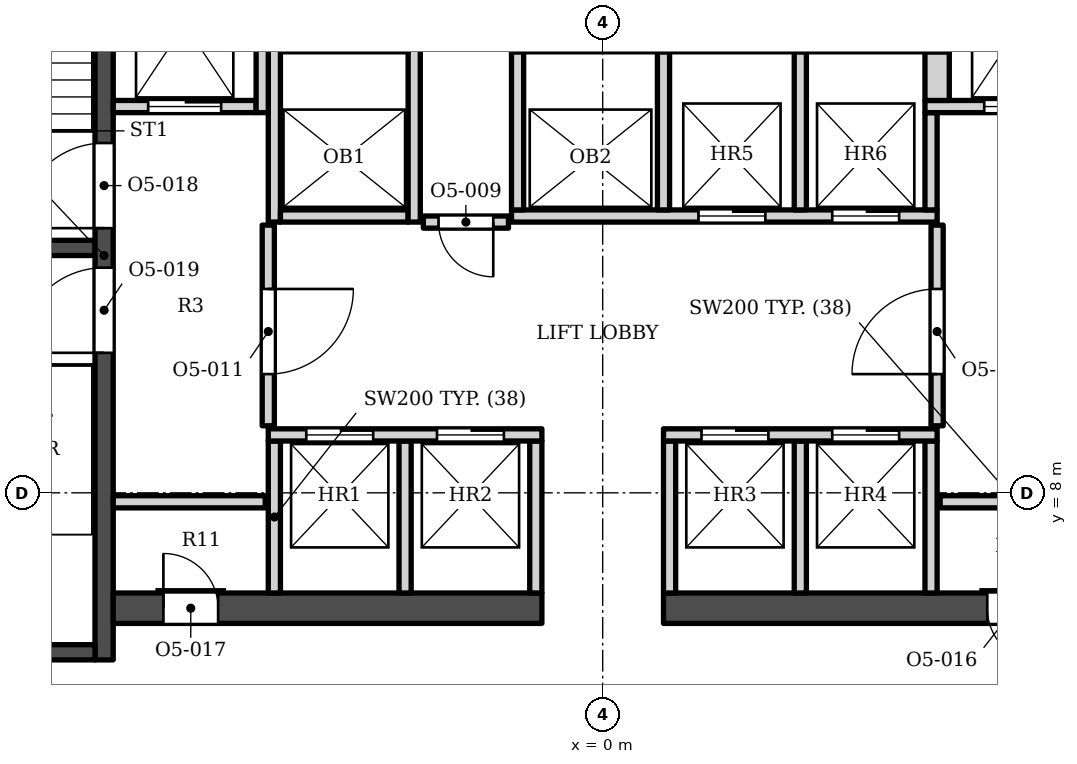
"""IFC4 building model, lengths in metres.
Left out: names, types, materials, properties, quantities, classifications, styles, units other than length and angle.
Written with IfcOpenShell. Run it as: python <this file> out.ifc"""

import sys

from ifc_helpers import new_model, si_unit, direction, frame, frame_2d, origin, place, context, subcontext, project, spatial, rectangle, extrude, element, fill, save


model = new_model("IFC4")
c1 = context("Model", 3, precision=1e-05, world=origin(), true_north=direction((0.0, 1.0)))
c2 = subcontext(c1, "Body", "Model", "MODEL_VIEW")
j1 = project(units=[si_unit("LENGTHUNIT", "METRE"), si_unit("PLANEANGLEUNIT", "RADIAN")], contexts=[c1])
p1 = place(None, origin())
s1 = spatial("IfcSite", under=j1, at=p1, CompositionType="ELEMENT")
p2 = place(p1, origin())
s2 = spatial("IfcBuilding", under=s1, at=p2, CompositionType="ELEMENT")
p3 = place(p2, frame((0.0, 0.0, 196.4)))
s3 = spatial("IfcBuildingStorey", under=s2, at=p3, CompositionType="ELEMENT", Elevation=196.4)
p4 = place(p3, frame((-8.2, 5.253, 0.0), z_axis=(0.0, 0.0, 1.0), x_axis=(0.0, 1.0, 0.0)))
e1 = element("IfcWall", 1, at=p4, inside=s3, PredefinedType="SHEAR", context=c2, shape_type="SweptSolid", body=[
    extrude(rectangle(XDim=13.3, YDim=0.3, at=frame_2d((6.65, 0.0))), origin(), (0.0, 0.0, 1.0), 3.9),
])
p5 = place(p4, frame((7.1, 0.0, 0.0)))
e2 = element("IfcOpeningElement", 2, at=p5, cuts=e1, PredefinedType="OPENING", context=c2, shape_type="SweptSolid", body=[
    extrude(rectangle(XDim=1.4, YDim=2.1, at=frame_2d((0.7, 1.05))), frame((0.0, 0.16, 0.0), z_axis=(0.0, -1.0, 0.0), x_axis=(1.0, 0.0, 0.0)), (0.0, 0.0, 1.0), 0.32),
])
p6 = place(p4, frame((5.05, 0.0, 0.0)))
e3 = element("IfcOpeningElement", 3, at=p6, cuts=e1, PredefinedType="OPENING", context=c2, shape_type="SweptSolid", body=[
    extrude(rectangle(XDim=1.4, YDim=2.1, at=frame_2d((0.7, 1.05))), frame((0.0, 0.16, 0.0), z_axis=(0.0, -1.0, 0.0), x_axis=(1.0, 0.0, 0.0)), (0.0, 0.0, 1.0), 0.32),
])
for number, where, z_axis, x_axis in (
    (4, (-12.1, 12.028, 0.0), (0.0, 0.0, 1.0), (1.0, 0.0, 0.0)),
    (5, (-12.1, 5.378, 0.0), (0.0, 0.0, 1.0), (1.0, 0.0, 0.0)),
):
    element("IfcWall", number, at=place(p3, frame(where, z_axis=z_axis, x_axis=x_axis)), inside=s3, PredefinedType="SHEAR", context=c2, shape_type="SweptSolid", body=[
        extrude(rectangle(XDim=3.75, YDim=0.25, at=frame_2d((1.875, 0.0))), origin(), (0.0, 0.0, 1.0), 3.9),
    ])
p7 = place(p3, frame((-8.05, 6.103, 0.0), z_axis=(0.0, 0.0, 1.0), x_axis=(1.0, 0.0, 0.0)))
e6 = element("IfcWall", 6, at=p7, inside=s3, PredefinedType="SHEAR", context=c2, shape_type="SweptSolid", body=[
    extrude(rectangle(XDim=7.05, YDim=0.5, at=frame_2d((3.525, 0.0))), origin(), (0.0, 0.0, 1.0), 3.9),
])
p8 = place(p7, frame((0.825, 0.0, 0.0)))
e7 = element("IfcOpeningElement", 7, at=p8, cuts=e6, PredefinedType="OPENING", context=c2, shape_type="SweptSolid", body=[
    extrude(rectangle(XDim=0.9, YDim=2.1, at=frame_2d((0.45, 1.05))), frame((0.0, 0.26, 0.0), z_axis=(0.0, -1.0, 0.0), x_axis=(1.0, 0.0, 0.0)), (0.0, 0.0, 1.0), 0.52),
])
p9 = place(p3, frame((1.0, 6.103, 0.0), z_axis=(0.0, 0.0, 1.0), x_axis=(1.0, 0.0, 0.0)))
e8 = element("IfcWall", 8, at=p9, inside=s3, PredefinedType="SHEAR", context=c2, shape_type="SweptSolid", body=[
    extrude(rectangle(XDim=7.05, YDim=0.5, at=frame_2d((3.525, 0.0))), origin(), (0.0, 0.0, 1.0), 3.9),
])
p10 = place(p9, frame((5.325, 0.0, 0.0)))
e9 = element("IfcOpeningElement", 9, at=p10, cuts=e8, PredefinedType="OPENING", context=c2, shape_type="SweptSolid", body=[
    extrude(rectangle(XDim=0.9, YDim=2.1, at=frame_2d((0.45, 1.05))), frame((0.0, 0.26, 0.0), z_axis=(0.0, -1.0, 0.0), x_axis=(1.0, 0.0, 0.0)), (0.0, 0.0, 1.0), 0.52),
])
for number, where, z_axis, x_axis in (
    (10, (-5.4, 6.353, 0.0), (0.0, 0.0, 1.0), (0.0, 1.0, 0.0)),
    (11, (-3.25, 6.353, 0.0), (0.0, 0.0, 1.0), (0.0, 1.0, 0.0)),
    (12, (-1.1, 6.353, 0.0), (0.0, 0.0, 1.0), (0.0, 1.0, 0.0)),
    (13, (1.1, 6.353, 0.0), (0.0, 0.0, 1.0), (0.0, 1.0, 0.0)),
    (14, (3.25, 6.353, 0.0), (0.0, 0.0, 1.0), (0.0, 1.0, 0.0)),
    (15, (5.4, 6.353, 0.0), (0.0, 0.0, 1.0), (0.0, 1.0, 0.0)),
    (16, (-8.05, 7.853, 0.0), (0.0, 0.0, 1.0), (1.0, 0.0, 0.0)),
    (17, (5.55, 7.853, 0.0), (0.0, 0.0, 1.0), (1.0, 0.0, 0.0)),
):
    element("IfcWall", number, at=place(p3, frame(where, z_axis=z_axis, x_axis=x_axis)), inside=s3, PredefinedType="SOLIDWALL", context=c2, shape_type="SweptSolid", body=[
        extrude(rectangle(XDim=2.5, YDim=0.2, at=frame_2d((1.25, 0.0))), origin(), (0.0, 0.0, 1.0), 3.73),
    ])
p11 = place(p3, frame((-5.5, 8.953, 0.0), z_axis=(0.0, 0.0, 1.0), x_axis=(1.0, 0.0, 0.0)))
e18 = element("IfcWall", 18, at=p11, inside=s3, PredefinedType="SOLIDWALL", context=c2, shape_type="SweptSolid", body=[
    extrude(rectangle(XDim=4.5, YDim=0.2, at=frame_2d((2.25, 0.0))), origin(), (0.0, 0.0, 1.0), 3.73),
])
p12 = place(p11, frame((0.625, 0.0, 0.0)))
e19 = element("IfcOpeningElement", 19, at=p12, cuts=e18, PredefinedType="OPENING", context=c2, shape_type="SweptSolid", body=[
    extrude(rectangle(XDim=1.1, YDim=2.1, at=frame_2d((0.55, 1.05))), frame((0.0, 0.11, 0.0), z_axis=(0.0, -1.0, 0.0), x_axis=(1.0, 0.0, 0.0)), (0.0, 0.0, 1.0), 0.22),
])
p13 = place(p11, frame((2.775, 0.0, 0.0)))
e20 = element("IfcOpeningElement", 20, at=p13, cuts=e18, PredefinedType="OPENING", context=c2, shape_type="SweptSolid", body=[
    extrude(rectangle(XDim=1.1, YDim=2.1, at=frame_2d((0.55, 1.05))), frame((0.0, 0.11, 0.0), z_axis=(0.0, -1.0, 0.0), x_axis=(1.0, 0.0, 0.0)), (0.0, 0.0, 1.0), 0.22),
])
p14 = place(p3, frame((1.0, 8.953, 0.0), z_axis=(0.0, 0.0, 1.0), x_axis=(1.0, 0.0, 0.0)))
e21 = element("IfcWall", 21, at=p14, inside=s3, PredefinedType="SOLIDWALL", context=c2, shape_type="SweptSolid", body=[
    extrude(rectangle(XDim=4.5, YDim=0.2, at=frame_2d((2.25, 0.0))), origin(), (0.0, 0.0, 1.0), 3.73),
])
p15 = place(p14, frame((0.625, 0.0, 0.0)))
e22 = element("IfcOpeningElement", 22, at=p15, cuts=e21, PredefinedType="OPENING", context=c2, shape_type="SweptSolid", body=[
    extrude(rectangle(XDim=1.1, YDim=2.1, at=frame_2d((0.55, 1.05))), frame((0.0, 0.11, 0.0), z_axis=(0.0, -1.0, 0.0), x_axis=(1.0, 0.0, 0.0)), (0.0, 0.0, 1.0), 0.22),
])
p16 = place(p14, frame((2.775, 0.0, 0.0)))
e23 = element("IfcOpeningElement", 23, at=p16, cuts=e21, PredefinedType="OPENING", context=c2, shape_type="SweptSolid", body=[
    extrude(rectangle(XDim=1.1, YDim=2.1, at=frame_2d((0.55, 1.05))), frame((0.0, 0.11, 0.0), z_axis=(0.0, -1.0, 0.0), x_axis=(1.0, 0.0, 0.0)), (0.0, 0.0, 1.0), 0.22),
])
p17 = place(p3, frame((-5.5, 9.103, 0.0), z_axis=(0.0, 0.0, 1.0), x_axis=(0.0, 1.0, 0.0)))
e24 = element("IfcWall", 24, at=p17, inside=s3, PredefinedType="SOLIDWALL", context=c2, shape_type="SweptSolid", body=[
    extrude(rectangle(XDim=3.3, YDim=0.2, at=frame_2d((1.65, 0.0))), origin(), (0.0, 0.0, 1.0), 3.73),
])
p18 = place(p17, frame((0.85, 0.0, 0.0)))
e25 = element("IfcOpeningElement", 25, at=p18, cuts=e24, PredefinedType="OPENING", context=c2, shape_type="SweptSolid", body=[
    extrude(rectangle(XDim=1.4, YDim=2.1, at=frame_2d((0.7, 1.05))), frame((0.0, 0.11, 0.0), z_axis=(0.0, -1.0, 0.0), x_axis=(1.0, 0.0, 0.0)), (0.0, 0.0, 1.0), 0.22),
])
p19 = place(p3, frame((5.5, 9.103, 0.0), z_axis=(0.0, 0.0, 1.0), x_axis=(0.0, 1.0, 0.0)))
e26 = element("IfcWall", 26, at=p19, inside=s3, PredefinedType="SOLIDWALL", context=c2, shape_type="SweptSolid", body=[
    extrude(rectangle(XDim=3.3, YDim=0.2, at=frame_2d((1.65, 0.0))), origin(), (0.0, 0.0, 1.0), 3.73),
])
p20 = place(p19, frame((0.85, 0.0, 0.0)))
e27 = element("IfcOpeningElement", 27, at=p20, cuts=e26, PredefinedType="OPENING", context=c2, shape_type="SweptSolid", body=[
    extrude(rectangle(XDim=1.4, YDim=2.1, at=frame_2d((0.7, 1.05))), frame((0.0, 0.11, 0.0), z_axis=(0.0, -1.0, 0.0), x_axis=(1.0, 0.0, 0.0)), (0.0, 0.0, 1.0), 0.22),
])
p21 = place(p3, frame((-2.95, 12.453, 0.0), z_axis=(0.0, 0.0, 1.0), x_axis=(1.0, 0.0, 0.0)))
e28 = element("IfcWall", 28, at=p21, inside=s3, PredefinedType="SOLIDWALL", context=c2, shape_type="SweptSolid", body=[
    extrude(rectangle(XDim=1.4, YDim=0.2, at=frame_2d((0.7, 0.0))), origin(), (0.0, 0.0, 1.0), 3.73),
])
p22 = place(p21, frame((0.25, 0.0, 0.0)))
e29 = element("IfcOpeningElement", 29, at=p22, cuts=e28, PredefinedType="OPENING", context=c2, shape_type="SweptSolid", body=[
    extrude(rectangle(XDim=0.9, YDim=2.1, at=frame_2d((0.45, 1.05))), frame((0.0, 0.11, 0.0), z_axis=(0.0, -1.0, 0.0), x_axis=(1.0, 0.0, 0.0)), (0.0, 0.0, 1.0), 0.22),
])
p23 = place(p3, frame((-5.4, 12.453, 0.0), z_axis=(0.0, 0.0, 1.0), x_axis=(0.0, 1.0, 0.0)))
e30 = element("IfcWall", 30, at=p23, inside=s3, PredefinedType="SOLIDWALL", context=c2, shape_type="SweptSolid", body=[
    extrude(rectangle(XDim=3.0, YDim=0.2, at=frame_2d((1.5, 0.0))), origin(), (0.0, 0.0, 1.0), 3.73),
])
p24 = place(p3, frame((-5.3, 12.552, 0.0), z_axis=(0.0, 0.0, 1.0), x_axis=(1.0, 0.0, 0.0)))
e31 = element("IfcWall", 31, at=p24, inside=s3, PredefinedType="SOLIDWALL", context=c2, shape_type="SweptSolid", body=[
    extrude(rectangle(XDim=2.1, YDim=0.2, at=frame_2d((1.05, 0.0))), origin(), (0.0, 0.0, 1.0), 3.73),
])
p25 = place(p3, frame((-3.1, 12.453, 0.0), z_axis=(0.0, 0.0, 1.0), x_axis=(0.0, 1.0, 0.0)))
e32 = element("IfcWall", 32, at=p25, inside=s3, PredefinedType="SOLIDWALL", context=c2, shape_type="SweptSolid", body=[
    extrude(rectangle(XDim=3.0, YDim=0.2, at=frame_2d((1.5, 0.0))), origin(), (0.0, 0.0, 1.0), 3.73),
])
p26 = place(p3, frame((-1.5, 12.552, 0.0), z_axis=(0.0, 0.0, 1.0), x_axis=(1.0, 0.0, 0.0)))
e33 = element("IfcWall", 33, at=p26, inside=s3, PredefinedType="SOLIDWALL", context=c2, shape_type="SweptSolid", body=[
    extrude(rectangle(XDim=7.0, YDim=0.2, at=frame_2d((3.5, 0.0))), origin(), (0.0, 0.0, 1.0), 3.73),
])
p27 = place(p26, frame((3.075, 0.0, 0.0)))
e34 = element("IfcOpeningElement", 34, at=p27, cuts=e33, PredefinedType="OPENING", context=c2, shape_type="SweptSolid", body=[
    extrude(rectangle(XDim=1.1, YDim=2.1, at=frame_2d((0.55, 1.05))), frame((0.0, 0.11, 0.0), z_axis=(0.0, -1.0, 0.0), x_axis=(1.0, 0.0, 0.0)), (0.0, 0.0, 1.0), 0.22),
])
p28 = place(p26, frame((5.275, 0.0, 0.0)))
e35 = element("IfcOpeningElement", 35, at=p28, cuts=e33, PredefinedType="OPENING", context=c2, shape_type="SweptSolid", body=[
    extrude(rectangle(XDim=1.1, YDim=2.1, at=frame_2d((0.55, 1.05))), frame((0.0, 0.11, 0.0), z_axis=(0.0, -1.0, 0.0), x_axis=(1.0, 0.0, 0.0)), (0.0, 0.0, 1.0), 0.22),
])
for number, where, z_axis, x_axis in (
    (36, (-1.4, 12.653, 0.0), (0.0, 0.0, 1.0), (0.0, 1.0, 0.0)),
    (37, (1.0, 12.653, 0.0), (0.0, 0.0, 1.0), (0.0, 1.0, 0.0)),
    (38, (3.25, 12.653, 0.0), (0.0, 0.0, 1.0), (0.0, 1.0, 0.0)),
):
    element("IfcWall", number, at=place(p3, frame(where, z_axis=z_axis, x_axis=x_axis)), inside=s3, PredefinedType="SOLIDWALL", context=c2, shape_type="SweptSolid", body=[
        extrude(rectangle(XDim=2.6, YDim=0.2, at=frame_2d((1.3, 0.0))), origin(), (0.0, 0.0, 1.0), 3.73),
    ])
p29 = place(p3, frame((5.4, 12.653, 0.0), z_axis=(0.0, 0.0, 1.0), x_axis=(0.0, 1.0, 0.0)))
e39 = element("IfcWall", 39, at=p29, inside=s3, PredefinedType="SOLIDWALL", context=c2, shape_type="SweptSolid", body=[
    extrude(rectangle(XDim=1.6, YDim=0.2, at=frame_2d((0.8, 0.0))), origin(), (0.0, 0.0, 1.0), 3.73),
])
p30 = place(p3, frame((-8.05, 14.353, 0.0), z_axis=(0.0, 0.0, 1.0), x_axis=(1.0, 0.0, 0.0)))
e40 = element("IfcWall", 40, at=p30, inside=s3, PredefinedType="SOLIDWALL", context=c2, shape_type="SweptSolid", body=[
    extrude(rectangle(XDim=2.35, YDim=0.2, at=frame_2d((1.175, 0.0))), origin(), (0.0, 0.0, 1.0), 3.73),
])
p31 = place(p30, frame((0.575, 0.0, 0.0)))
e41 = element("IfcOpeningElement", 41, at=p31, cuts=e40, PredefinedType="OPENING", context=c2, shape_type="SweptSolid", body=[
    extrude(rectangle(XDim=1.2, YDim=2.1, at=frame_2d((0.6, 1.05))), frame((0.0, 0.11, 0.0), z_axis=(0.0, -1.0, 0.0), x_axis=(1.0, 0.0, 0.0)), (0.0, 0.0, 1.0), 0.22),
])
p32 = place(p3, frame((-5.6, 14.253, 0.0), z_axis=(0.0, 0.0, 1.0), x_axis=(0.0, 1.0, 0.0)))
e42 = element("IfcWall", 42, at=p32, inside=s3, PredefinedType="SOLIDWALL", context=c2, shape_type="SweptSolid", body=[
    extrude(rectangle(XDim=4.3, YDim=0.2, at=frame_2d((2.15, 0.0))), origin(), (0.0, 0.0, 1.0), 3.73),
])
p33 = place(p3, frame((5.3, 14.353, 0.0), z_axis=(0.0, 0.0, 1.0), x_axis=(1.0, 0.0, 0.0)))
e43 = element("IfcWall", 43, at=p33, inside=s3, PredefinedType="SOLIDWALL", context=c2, shape_type="SweptSolid", body=[
    extrude(rectangle(XDim=2.75, YDim=0.2, at=frame_2d((1.375, 0.0))), origin(), (0.0, 0.0, 1.0), 3.73),
])
p34 = place(p33, frame((0.975, 0.0, 0.0)))
e44 = element("IfcOpeningElement", 44, at=p34, cuts=e43, PredefinedType="OPENING", context=c2, shape_type="SweptSolid", body=[
    extrude(rectangle(XDim=1.2, YDim=2.1, at=frame_2d((0.6, 1.05))), frame((0.0, 0.11, 0.0), z_axis=(0.0, -1.0, 0.0), x_axis=(1.0, 0.0, 0.0)), (0.0, 0.0, 1.0), 0.22),
])
p35 = place(p3, frame((5.5, 14.453, 0.0), z_axis=(0.0, 0.0, 1.0), x_axis=(0.0, 1.0, 0.0)))
e45 = element("IfcWall", 45, at=p35, inside=s3, PredefinedType="SOLIDWALL", context=c2, shape_type="SweptSolid", body=[
    extrude(rectangle(XDim=0.8, YDim=0.4, at=frame_2d((0.4, 0.0))), origin(), (0.0, 0.0, 1.0), 3.73),
])
p36 = place(p3, frame((-5.3, 15.353, 0.0), z_axis=(0.0, 0.0, 1.0), x_axis=(1.0, 0.0, 0.0)))
e46 = element("IfcWall", 46, at=p36, inside=s3, PredefinedType="SOLIDWALL", context=c2, shape_type="SweptSolid", body=[
    extrude(rectangle(XDim=2.1, YDim=0.2, at=frame_2d((1.05, 0.0))), origin(), (0.0, 0.0, 1.0), 3.73),
])
p37 = place(p3, frame((-1.5, 15.353, 0.0), z_axis=(0.0, 0.0, 1.0), x_axis=(1.0, 0.0, 0.0)))
e47 = element("IfcWall", 47, at=p37, inside=s3, PredefinedType="SOLIDWALL", context=c2, shape_type="SweptSolid", body=[
    extrude(rectangle(XDim=7.2, YDim=0.2, at=frame_2d((3.6, 0.0))), origin(), (0.0, 0.0, 1.0), 3.73),
])
p38 = place(p12, origin())
e48 = element("IfcDoor", 48, at=p38, inside=s3, OperationType="DOUBLE_DOOR_SLIDING", PredefinedType="DOOR", context=c2, shape_type="SweptSolid", body=[
    extrude(rectangle(XDim=1.1, YDim=2.1, at=frame_2d((0.55, 1.05))), frame((0.0, 0.025, 0.0), z_axis=(0.0, -1.0, 0.0), x_axis=(1.0, 0.0, 0.0)), (0.0, 0.0, 1.0), 0.05),
])
fill(e19, e48)
p39 = place(p13, origin())
e49 = element("IfcDoor", 49, at=p39, inside=s3, OperationType="DOUBLE_DOOR_SLIDING", PredefinedType="DOOR", context=c2, shape_type="SweptSolid", body=[
    extrude(rectangle(XDim=1.1, YDim=2.1, at=frame_2d((0.55, 1.05))), frame((0.0, 0.025, 0.0), z_axis=(0.0, -1.0, 0.0), x_axis=(1.0, 0.0, 0.0)), (0.0, 0.0, 1.0), 0.05),
])
fill(e20, e49)
p40 = place(p15, origin())
e50 = element("IfcDoor", 50, at=p40, inside=s3, OperationType="DOUBLE_DOOR_SLIDING", PredefinedType="DOOR", context=c2, shape_type="SweptSolid", body=[
    extrude(rectangle(XDim=1.1, YDim=2.1, at=frame_2d((0.55, 1.05))), frame((0.0, 0.025, 0.0), z_axis=(0.0, -1.0, 0.0), x_axis=(1.0, 0.0, 0.0)), (0.0, 0.0, 1.0), 0.05),
])
fill(e22, e50)
p41 = place(p16, origin())
e51 = element("IfcDoor", 51, at=p41, inside=s3, OperationType="DOUBLE_DOOR_SLIDING", PredefinedType="DOOR", context=c2, shape_type="SweptSolid", body=[
    extrude(rectangle(XDim=1.1, YDim=2.1, at=frame_2d((0.55, 1.05))), frame((0.0, 0.025, 0.0), z_axis=(0.0, -1.0, 0.0), x_axis=(1.0, 0.0, 0.0)), (0.0, 0.0, 1.0), 0.05),
])
fill(e23, e51)
p42 = place(p27, origin())
e52 = element("IfcDoor", 52, at=p42, inside=s3, OperationType="DOUBLE_DOOR_SLIDING", PredefinedType="DOOR", context=c2, shape_type="SweptSolid", body=[
    extrude(rectangle(XDim=1.1, YDim=2.1, at=frame_2d((0.55, 1.05))), frame((0.0, 0.025, 0.0), z_axis=(0.0, -1.0, 0.0), x_axis=(1.0, 0.0, 0.0)), (0.0, 0.0, 1.0), 0.05),
])
fill(e34, e52)
p43 = place(p28, origin())
e53 = element("IfcDoor", 53, at=p43, inside=s3, OperationType="DOUBLE_DOOR_SLIDING", PredefinedType="DOOR", context=c2, shape_type="SweptSolid", body=[
    extrude(rectangle(XDim=1.1, YDim=2.1, at=frame_2d((0.55, 1.05))), frame((0.0, 0.025, 0.0), z_axis=(0.0, -1.0, 0.0), x_axis=(1.0, 0.0, 0.0)), (0.0, 0.0, 1.0), 0.05),
])
fill(e35, e53)
p44 = place(p31, origin())
e54 = element("IfcDoor", 54, at=p44, inside=s3, OperationType="DOUBLE_DOOR_SLIDING", PredefinedType="DOOR", context=c2, shape_type="SweptSolid", body=[
    extrude(rectangle(XDim=1.2, YDim=2.1, at=frame_2d((0.6, 1.05))), frame((0.0, 0.025, 0.0), z_axis=(0.0, -1.0, 0.0), x_axis=(1.0, 0.0, 0.0)), (0.0, 0.0, 1.0), 0.05),
])
fill(e41, e54)
p45 = place(p34, origin())
e55 = element("IfcDoor", 55, at=p45, inside=s3, OperationType="DOUBLE_DOOR_SLIDING", PredefinedType="DOOR", context=c2, shape_type="SweptSolid", body=[
    extrude(rectangle(XDim=1.2, YDim=2.1, at=frame_2d((0.6, 1.05))), frame((0.0, 0.025, 0.0), z_axis=(0.0, -1.0, 0.0), x_axis=(1.0, 0.0, 0.0)), (0.0, 0.0, 1.0), 0.05),
])
fill(e44, e55)
p46 = place(p5, origin())
e56 = element("IfcDoor", 56, at=p46, inside=s3, OperationType="SINGLE_SWING_LEFT", PredefinedType="DOOR", context=c2, shape_type="SweptSolid", body=[
    extrude(rectangle(XDim=1.4, YDim=2.1, at=frame_2d((0.7, 1.05))), frame((0.0, 0.025, 0.0), z_axis=(0.0, -1.0, 0.0), x_axis=(1.0, 0.0, 0.0)), (0.0, 0.0, 1.0), 0.05),
])
fill(e2, e56)
p47 = place(p6, origin())
e57 = element("IfcDoor", 57, at=p47, inside=s3, OperationType="SINGLE_SWING_LEFT", PredefinedType="DOOR", context=c2, shape_type="SweptSolid", body=[
    extrude(rectangle(XDim=1.4, YDim=2.1, at=frame_2d((0.7, 1.05))), frame((0.0, 0.025, 0.0), z_axis=(0.0, -1.0, 0.0), x_axis=(1.0, 0.0, 0.0)), (0.0, 0.0, 1.0), 0.05),
])
fill(e3, e57)
p48 = place(p22, origin())
e58 = element("IfcDoor", 58, at=p48, inside=s3, OperationType="SINGLE_SWING_RIGHT", PredefinedType="DOOR", context=c2, shape_type="SweptSolid", body=[
    extrude(rectangle(XDim=0.9, YDim=2.1, at=frame_2d((0.45, 1.05))), frame((0.0, 0.025, 0.0), z_axis=(0.0, -1.0, 0.0), x_axis=(1.0, 0.0, 0.0)), (0.0, 0.0, 1.0), 0.05),
])
fill(e29, e58)
p49 = place(p18, origin())
e59 = element("IfcDoor", 59, at=p49, inside=s3, OperationType="SINGLE_SWING_RIGHT", PredefinedType="DOOR", context=c2, shape_type="SweptSolid", body=[
    extrude(rectangle(XDim=1.4, YDim=2.1, at=frame_2d((0.7, 1.05))), frame((0.0, 0.025, 0.0), z_axis=(0.0, -1.0, 0.0), x_axis=(1.0, 0.0, 0.0)), (0.0, 0.0, 1.0), 0.05),
])
fill(e25, e59)
p50 = place(p20, origin())
e60 = element("IfcDoor", 60, at=p50, inside=s3, OperationType="SINGLE_SWING_LEFT", PredefinedType="DOOR", context=c2, shape_type="SweptSolid", body=[
    extrude(rectangle(XDim=1.4, YDim=2.1, at=frame_2d((0.7, 1.05))), frame((0.0, 0.025, 0.0), z_axis=(0.0, -1.0, 0.0), x_axis=(1.0, 0.0, 0.0)), (0.0, 0.0, 1.0), 0.05),
])
fill(e27, e60)
p51 = place(p8, origin())
e61 = element("IfcDoor", 61, at=p51, inside=s3, OperationType="SINGLE_SWING_LEFT", PredefinedType="DOOR", context=c2, shape_type="SweptSolid", body=[
    extrude(rectangle(XDim=0.9, YDim=2.1, at=frame_2d((0.45, 1.05))), frame((0.0, 0.025, 0.0), z_axis=(0.0, -1.0, 0.0), x_axis=(1.0, 0.0, 0.0)), (0.0, 0.0, 1.0), 0.05),
])
fill(e7, e61)
p52 = place(p10, origin())
e62 = element("IfcDoor", 62, at=p52, inside=s3, OperationType="SINGLE_SWING_RIGHT", PredefinedType="DOOR", context=c2, shape_type="SweptSolid", body=[
    extrude(rectangle(XDim=0.9, YDim=2.1, at=frame_2d((0.45, 1.05))), frame((0.0, 0.025, 0.0), z_axis=(0.0, -1.0, 0.0), x_axis=(1.0, 0.0, 0.0)), (0.0, 0.0, 1.0), 0.05),
])
fill(e9, e62)
save(model, sys.argv[1])
